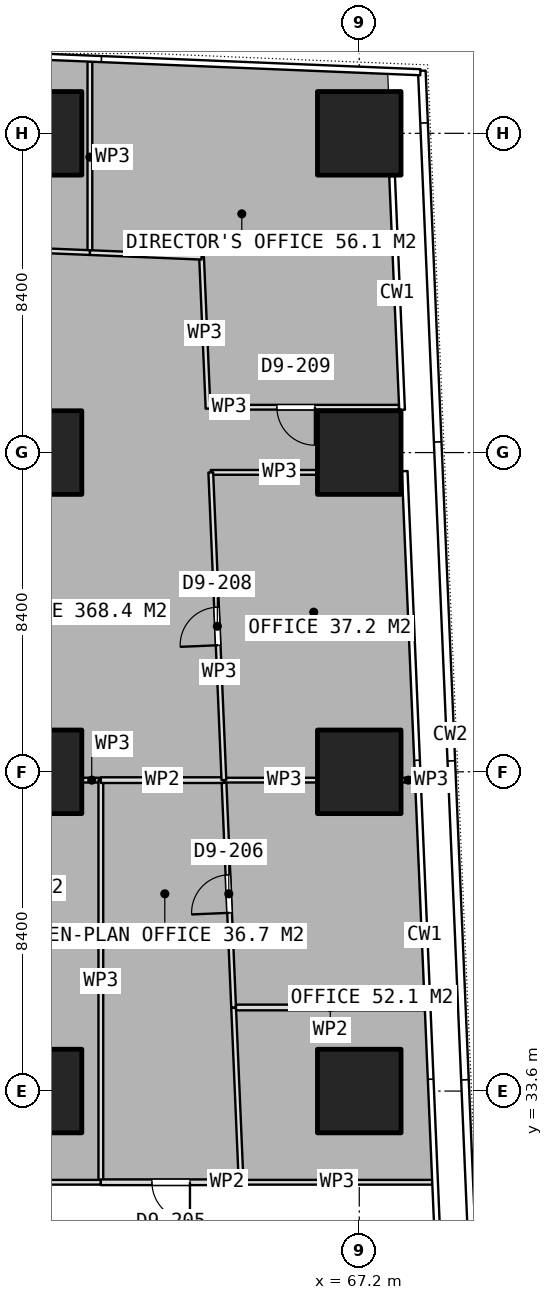
"""IFC4 building model, lengths in metres.
Left out: names, types, materials, properties, quantities, classifications, styles, units other than length and angle.
Written with IfcOpenShell. Run it as: python <this file> out.ifc"""

import sys

from ifc_helpers import new_model, si_unit, direction, frame, frame_2d, origin, origin_2d, place, context, subcontext, project, spatial, rectangle, extrude, element, fill, save


model = new_model("IFC4")
c1 = context("Model", 3, precision=1e-05, world=origin(), true_north=direction((0.0, 1.0)))
c2 = subcontext(c1, "Body", "Model", "MODEL_VIEW")
j1 = project(units=[si_unit("LENGTHUNIT", "METRE"), si_unit("PLANEANGLEUNIT", "RADIAN")], contexts=[c1])
p1 = place(None, origin())
s1 = spatial("IfcSite", under=j1, at=p1, CompositionType="ELEMENT")
p2 = place(p1, origin())
s2 = spatial("IfcBuilding", under=s1, at=p2, CompositionType="ELEMENT")
p3 = place(p2, frame((0.0, 0.0, 62.9)))
s3 = spatial("IfcBuildingStorey", under=s2, at=p3, CompositionType="ELEMENT", Elevation=62.9)
for number, where, z_axis, x_axis in (
    (1, (58.8, 33.6, 0.0), (0.0, 0.0, 1.0), (1.0, 0.0, 0.0)),
    (2, (58.8, 42.0, 0.0), (0.0, 0.0, 1.0), (1.0, 0.0, 0.0)),
    (3, (58.8, 50.4, 0.0), (0.0, 0.0, 1.0), (1.0, 0.0, 0.0)),
    (4, (58.8, 58.8, 0.0), (0.0, 0.0, 1.0), (1.0, 0.0, 0.0)),
    (5, (67.2, 33.6, 0.0), (0.0, 0.0, 1.0), (1.0, 0.0, 0.0)),
    (6, (67.2, 42.0, 0.0), (0.0, 0.0, 1.0), (1.0, 0.0, 0.0)),
    (7, (67.2, 50.4, 0.0), (0.0, 0.0, 1.0), (1.0, 0.0, 0.0)),
    (8, (67.2, 58.8, 0.0), (0.0, 0.0, 1.0), (1.0, 0.0, 0.0)),
):
    element("IfcColumn", number, at=place(p3, frame(where, z_axis=z_axis, x_axis=x_axis)), inside=s3, PredefinedType="COLUMN", context=c2, shape_type="SweptSolid", body=[
        extrude(rectangle(XDim=2.2, YDim=2.2, at=origin_2d()), origin(), (0.0, 0.0, 1.0), 3.75),
    ])
p4 = place(p3, frame((69.145, 31.2, 0.0), z_axis=(0.0, 0.0, 1.0), x_axis=(-1.0, 0.0, 0.0)))
e9 = element("IfcWall", 9, at=p4, inside=s3, PredefinedType="PARTITIONING", context=c2, shape_type="SweptSolid", body=[
    extrude(rectangle(XDim=5.054, YDim=0.125, at=frame_2d((2.527, 0.0))), origin(), (0.0, 0.0, 1.0), 3.5),
])
p5 = place(p3, frame((64.091, 31.2, 0.0), z_axis=(0.0, 0.0, 1.0), x_axis=(-0.042817838392, 0.999082895818, 0.0)))
e10 = element("IfcWall", 10, at=p5, inside=s3, PredefinedType="PARTITIONING", context=c2, shape_type="SweptSolid", body=[
    extrude(rectangle(XDim=4.601, YDim=0.125, at=frame_2d((2.301, 0.0))), origin(), (0.0, 0.0, 1.0), 3.5),
])
p6 = place(p3, frame((63.894, 35.797, 0.0), z_axis=(0.0, 0.0, 1.0), x_axis=(-0.042596960129, 0.999092337568, 0.0)))
e11 = element("IfcWall", 11, at=p6, inside=s3, PredefinedType="PARTITIONING", context=c2, shape_type="SweptSolid", body=[
    extrude(rectangle(XDim=5.989, YDim=0.125, at=frame_2d((2.995, 0.0))), origin(), (0.0, 0.0, 1.0), 3.5),
])
p7 = place(p6, frame((2.495, 0.0, 0.0)))
e12 = element("IfcOpeningElement", 12, at=p7, cuts=e11, PredefinedType="OPENING", context=c2, shape_type="SweptSolid", body=[
    extrude(rectangle(XDim=1.0, YDim=2.1, at=frame_2d((0.5, 1.05))), frame((0.0, 0.073, 0.0), z_axis=(0.0, -1.0, 0.0), x_axis=(1.0, 0.0, 0.0)), (0.0, 0.0, 1.0), 0.145),
])
p8 = place(p3, frame((63.639, 41.781, 0.0), z_axis=(0.0, 0.0, 1.0), x_axis=(1.0, 0.0, 0.0)))
e13 = element("IfcWall", 13, at=p8, inside=s3, PredefinedType="PARTITIONING", context=c2, shape_type="SweptSolid", body=[
    extrude(rectangle(XDim=2.441, YDim=0.125, at=frame_2d((1.221, 0.0))), origin(), (0.0, 0.0, 1.0), 3.5),
])
p9 = place(p3, frame((68.32, 41.781, 0.0), z_axis=(0.0, 0.0, 1.0), x_axis=(1.0, 0.0, 0.0)))
e14 = element("IfcWall", 14, at=p9, inside=s3, PredefinedType="PARTITIONING", context=c2, shape_type="SweptSolid", body=[
    extrude(rectangle(XDim=0.343, YDim=0.125, at=frame_2d((0.171, 0.0))), origin(), (0.0, 0.0, 1.0), 3.5),
])
p10 = place(p3, frame((59.92, 41.781, 0.0), z_axis=(0.0, 0.0, 1.0), x_axis=(1.0, 0.0, 0.0)))
e15 = element("IfcWall", 15, at=p10, inside=s3, PredefinedType="PARTITIONING", context=c2, shape_type="SweptSolid", body=[
    extrude(rectangle(XDim=0.48, YDim=0.125, at=frame_2d((0.24, 0.0))), origin(), (0.0, 0.0, 1.0), 3.5),
])
p11 = place(p3, frame((60.4, 41.781, 0.0), z_axis=(0.0, 0.0, 1.0), x_axis=(0.0, -1.0, 0.0)))
e16 = element("IfcWall", 16, at=p11, inside=s3, PredefinedType="PARTITIONING", context=c2, shape_type="SweptSolid", body=[
    extrude(rectangle(XDim=10.581, YDim=0.125, at=frame_2d((5.291, 0.0))), origin(), (0.0, 0.0, 1.0), 3.5),
])
p12 = place(p3, frame((60.4, 31.2, 0.0), z_axis=(0.0, 0.0, 1.0), x_axis=(-1.0, 0.0, 0.0)))
e17 = element("IfcWall", 17, at=p12, inside=s3, PredefinedType="PARTITIONING", context=c2, shape_type="SweptSolid", body=[
    extrude(rectangle(XDim=4.2, YDim=0.125, at=frame_2d((2.1, 0.0))), origin(), (0.0, 0.0, 1.0), 3.5),
])
p13 = place(p3, frame((63.956, 35.799, 0.0), z_axis=(0.0, 0.0, 1.0), x_axis=(1.0, 0.0, 0.0)))
e18 = element("IfcWall", 18, at=p13, inside=s3, PredefinedType="PARTITIONING", context=c2, shape_type="SweptSolid", body=[
    extrude(rectangle(XDim=4.963, YDim=0.15, at=frame_2d((2.481, 0.0))), origin(), (0.0, 0.0, 1.0), 3.5),
])
p14 = place(p3, frame((64.091, 31.2, 0.0), z_axis=(0.0, 0.0, 1.0), x_axis=(-1.0, 0.0, 0.0)))
e19 = element("IfcWall", 19, at=p14, inside=s3, PredefinedType="PARTITIONING", context=c2, shape_type="SweptSolid", body=[
    extrude(rectangle(XDim=3.691, YDim=0.15, at=frame_2d((1.846, 0.0))), origin(), (0.0, 0.0, 1.0), 3.5),
])
p15 = place(p14, frame((1.346, 0.0, 0.0)))
e20 = element("IfcOpeningElement", 20, at=p15, cuts=e19, PredefinedType="OPENING", context=c2, shape_type="SweptSolid", body=[
    extrude(rectangle(XDim=1.0, YDim=2.1, at=frame_2d((0.5, 1.05))), frame((0.0, 0.085, 0.0), z_axis=(0.0, -1.0, 0.0), x_axis=(1.0, 0.0, 0.0)), (0.0, 0.0, 1.0), 0.17),
])
p16 = place(p3, frame((60.4, 41.781, 0.0), z_axis=(0.0, 0.0, 1.0), x_axis=(1.0, 0.0, 0.0)))
e21 = element("IfcWall", 21, at=p16, inside=s3, PredefinedType="PARTITIONING", context=c2, shape_type="SweptSolid", body=[
    extrude(rectangle(XDim=3.239, YDim=0.15, at=frame_2d((1.62, 0.0))), origin(), (0.0, 0.0, 1.0), 3.5),
])
p17 = place(p3, frame((63.293, 49.879, 0.0), z_axis=(0.0, 0.0, 1.0), x_axis=(1.0, 0.0, 0.0)))
e22 = element("IfcWall", 22, at=p17, inside=s3, PredefinedType="PARTITIONING", context=c2, shape_type="SweptSolid", body=[
    extrude(rectangle(XDim=2.787, YDim=0.125, at=frame_2d((1.394, 0.0))), origin(), (0.0, 0.0, 1.0), 3.5),
])
p18 = place(p3, frame((63.639, 41.782, 0.0), z_axis=(0.0, 0.0, 1.0), x_axis=(-0.042686820675, 0.999088502256, 0.0)))
e23 = element("IfcWall", 23, at=p18, inside=s3, PredefinedType="PARTITIONING", context=c2, shape_type="SweptSolid", body=[
    extrude(rectangle(XDim=8.104, YDim=0.125, at=frame_2d((4.052, 0.0))), origin(), (0.0, 0.0, 1.0), 3.5),
])
p19 = place(p18, frame((3.552, 0.0, 0.0)))
e24 = element("IfcOpeningElement", 24, at=p19, cuts=e23, PredefinedType="OPENING", context=c2, shape_type="SweptSolid", body=[
    extrude(rectangle(XDim=1.0, YDim=2.1, at=frame_2d((0.5, 1.05))), frame((0.0, 0.073, 0.0), z_axis=(0.0, -1.0, 0.0), x_axis=(1.0, 0.0, 0.0)), (0.0, 0.0, 1.0), 0.145),
])
p20 = place(p3, frame((60.112, 55.662, 0.0), z_axis=(0.0, 0.0, 1.0), x_axis=(0.0, 1.0, 0.0)))
e25 = element("IfcWall", 25, at=p20, inside=s3, PredefinedType="PARTITIONING", context=c2, shape_type="SweptSolid", body=[
    extrude(rectangle(XDim=5.024, YDim=0.125, at=frame_2d((2.512, 0.0))), origin(), (0.0, 0.0, 1.0), 3.5),
])
p21 = place(p3, frame((68.244, 51.593, 0.0), z_axis=(0.0, 0.0, 1.0), x_axis=(-1.0, 0.0, 0.0)))
e26 = element("IfcWall", 26, at=p21, inside=s3, PredefinedType="PARTITIONING", context=c2, shape_type="SweptSolid", body=[
    extrude(rectangle(XDim=4.962, YDim=0.125, at=frame_2d((2.481, 0.0))), origin(), (0.0, 0.0, 1.0), 3.5),
])
p22 = place(p21, frame((2.211, 0.0, 0.0)))
e27 = element("IfcOpeningElement", 27, at=p22, cuts=e26, PredefinedType="OPENING", context=c2, shape_type="SweptSolid", body=[
    extrude(rectangle(XDim=1.0, YDim=2.1, at=frame_2d((0.5, 1.05))), frame((0.0, 0.073, 0.0), z_axis=(0.0, -1.0, 0.0), x_axis=(1.0, 0.0, 0.0)), (0.0, 0.0, 1.0), 0.145),
])
p23 = place(p3, frame((63.221, 51.557, 0.0), z_axis=(0.0, 0.0, 1.0), x_axis=(-0.042621363321, 0.999091296824, 0.0)))
e28 = element("IfcWall", 28, at=p23, inside=s3, PredefinedType="PARTITIONING", context=c2, shape_type="SweptSolid", body=[
    extrude(rectangle(XDim=3.987, YDim=0.125, at=frame_2d((1.993, 0.0))), origin(), (0.0, 0.0, 1.0), 3.5),
])
p24 = place(p3, frame((63.051, 55.54, 0.0), z_axis=(0.0, 0.0, 1.0), x_axis=(-0.9991385306, 0.041499357476, 0.0)))
e29 = element("IfcWall", 29, at=p24, inside=s3, PredefinedType="PARTITIONING", context=c2, shape_type="SweptSolid", body=[
    extrude(rectangle(XDim=2.941, YDim=0.125, at=frame_2d((1.471, 0.0))), origin(), (0.0, 0.0, 1.0), 3.5),
])
p25 = place(p3, frame((60.111, 55.662, 0.0), z_axis=(0.0, 0.0, 1.0), x_axis=(-0.999153902149, 0.041127604115, 0.0)))
e30 = element("IfcWall", 30, at=p25, inside=s3, PredefinedType="PARTITIONING", context=c2, shape_type="SweptSolid", body=[
    extrude(rectangle(XDim=8.702, YDim=0.125, at=frame_2d((4.351, 0.0))), origin(), (0.0, 0.0, 1.0), 3.5),
])
p26 = place(p25, frame((3.851, 0.0, 0.0)))
e31 = element("IfcOpeningElement", 31, at=p26, cuts=e30, PredefinedType="OPENING", context=c2, shape_type="SweptSolid", body=[
    extrude(rectangle(XDim=1.0, YDim=2.1, at=frame_2d((0.5, 1.05))), frame((0.0, 0.073, 0.0), z_axis=(0.0, -1.0, 0.0), x_axis=(1.0, 0.0, 0.0)), (0.0, 0.0, 1.0), 0.145),
])
p27 = place(p7, origin())
e32 = element("IfcDoor", 32, at=p27, inside=s3, OperationType="SINGLE_SWING_LEFT", PredefinedType="DOOR", context=c2, shape_type="SweptSolid", body=[
    extrude(rectangle(XDim=1.0, YDim=2.1, at=frame_2d((0.5, 1.05))), frame((0.0, 0.025, 0.0), z_axis=(0.0, -1.0, 0.0), x_axis=(1.0, 0.0, 0.0)), (0.0, 0.0, 1.0), 0.05),
])
fill(e12, e32)
p28 = place(p15, origin())
e33 = element("IfcDoor", 33, at=p28, inside=s3, OperationType="SINGLE_SWING_LEFT", PredefinedType="DOOR", context=c2, shape_type="SweptSolid", body=[
    extrude(rectangle(XDim=1.0, YDim=2.1, at=frame_2d((0.5, 1.05))), frame((0.0, 0.025, 0.0), z_axis=(0.0, -1.0, 0.0), x_axis=(1.0, 0.0, 0.0)), (0.0, 0.0, 1.0), 0.05),
])
fill(e20, e33)
p29 = place(p19, origin())
e34 = element("IfcDoor", 34, at=p29, inside=s3, OperationType="SINGLE_SWING_LEFT", PredefinedType="DOOR", context=c2, shape_type="SweptSolid", body=[
    extrude(rectangle(XDim=1.0, YDim=2.1, at=frame_2d((0.5, 1.05))), frame((0.0, 0.025, 0.0), z_axis=(0.0, -1.0, 0.0), x_axis=(1.0, 0.0, 0.0)), (0.0, 0.0, 1.0), 0.05),
])
fill(e24, e34)
p30 = place(p22, origin())
e35 = element("IfcDoor", 35, at=p30, inside=s3, OperationType="SINGLE_SWING_LEFT", PredefinedType="DOOR", context=c2, shape_type="SweptSolid", body=[
    extrude(rectangle(XDim=1.0, YDim=2.1, at=frame_2d((0.5, 1.05))), frame((0.0, 0.025, 0.0), z_axis=(0.0, -1.0, 0.0), x_axis=(1.0, 0.0, 0.0)), (0.0, 0.0, 1.0), 0.05),
])
fill(e27, e35)
save(model, sys.argv[1])
